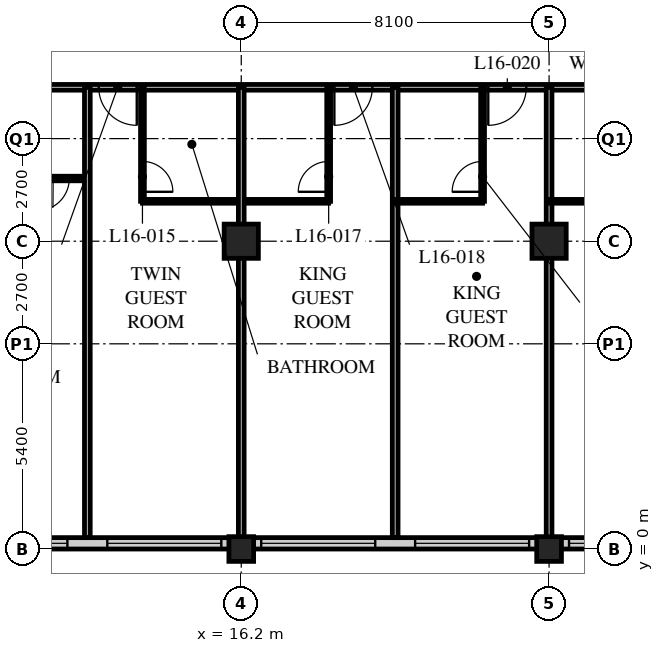
"""IFC4 building model, lengths in metres.
Left out: names, types, materials, properties, quantities, classifications, styles, units other than length and angle.
Written with IfcOpenShell. Run it as: python <this file> out.ifc"""

import sys

from ifc_helpers import new_model, si_unit, direction, frame, frame_2d, origin, origin_2d, place, context, subcontext, project, spatial, rectangle, hollow_rectangle, extrude, element, fill, save


model = new_model("IFC4")
c1 = context("Model", 3, precision=1e-05, world=origin(), true_north=direction((0.0, 1.0)))
c2 = subcontext(c1, "Body", "Model", "MODEL_VIEW")
j1 = project(units=[si_unit("LENGTHUNIT", "METRE"), si_unit("PLANEANGLEUNIT", "RADIAN")], contexts=[c1])
p1 = place(None, origin())
s1 = spatial("IfcSite", under=j1, at=p1, CompositionType="ELEMENT")
p2 = place(p1, origin())
s2 = spatial("IfcBuilding", under=s1, at=p2, CompositionType="ELEMENT")
p3 = place(p2, frame((0.0, 0.0, 67.0)))
s3 = spatial("IfcBuildingStorey", under=s2, at=p3, CompositionType="ELEMENT", Elevation=67.0)
p4 = place(p3, frame((16.2, 0.0, 0.0), z_axis=(0.0, 0.0, 1.0), x_axis=(1.0, 0.0, 0.0)))
e1 = element("IfcColumn", 1, at=p4, inside=s3, PredefinedType="COLUMN", context=c2, shape_type="SweptSolid", body=[
    extrude(hollow_rectangle(XDim=0.65, YDim=0.65, WallThickness=0.05, at=origin_2d()), origin(), (0.0, 0.0, 1.0), 3.4),
])
p5 = place(p3, frame((16.2, 8.1, 0.0), z_axis=(0.0, 0.0, 1.0), x_axis=(1.0, 0.0, 0.0)))
e2 = element("IfcColumn", 2, at=p5, inside=s3, PredefinedType="COLUMN", context=c2, shape_type="SweptSolid", body=[
    extrude(hollow_rectangle(XDim=0.9, YDim=0.9, WallThickness=0.09, at=origin_2d()), origin(), (0.0, 0.0, 1.0), 3.4),
])
p6 = place(p3, frame((24.3, 0.0, 0.0), z_axis=(0.0, 0.0, 1.0), x_axis=(1.0, 0.0, 0.0)))
e3 = element("IfcColumn", 3, at=p6, inside=s3, PredefinedType="COLUMN", context=c2, shape_type="SweptSolid", body=[
    extrude(hollow_rectangle(XDim=0.65, YDim=0.65, WallThickness=0.05, at=origin_2d()), origin(), (0.0, 0.0, 1.0), 3.4),
])
p7 = place(p3, frame((24.3, 8.1, 0.0), z_axis=(0.0, 0.0, 1.0), x_axis=(1.0, 0.0, 0.0)))
e4 = element("IfcColumn", 4, at=p7, inside=s3, PredefinedType="COLUMN", context=c2, shape_type="SweptSolid", body=[
    extrude(hollow_rectangle(XDim=0.9, YDim=0.9, WallThickness=0.09, at=origin_2d()), origin(), (0.0, 0.0, 1.0), 3.4),
])
p8 = place(p3, frame((8.4, 0.15, 0.0), z_axis=(0.0, 0.0, 1.0), x_axis=(1.0, 0.0, 0.0)))
e5 = element("IfcWall", 5, at=p8, inside=s3, PredefinedType="SOLIDWALL", context=c2, shape_type="SweptSolid", body=[
    extrude(rectangle(XDim=40.2, YDim=0.3, at=frame_2d((20.1, 0.0))), origin(), (0.0, 0.0, 1.0), 3.19),
])
p9 = place(p8, frame((0.225, 0.0, 0.9)))
e6 = element("IfcOpeningElement", 6, at=p9, cuts=e5, PredefinedType="OPENING", context=c2, shape_type="SweptSolid", body=[
    extrude(rectangle(XDim=3.0, YDim=2.0, at=frame_2d((1.5, 1.0))), frame((0.0, 0.16, 0.0), z_axis=(0.0, -1.0, 0.0), x_axis=(1.0, 0.0, 0.0)), (0.0, 0.0, 1.0), 0.32),
])
p10 = place(p8, frame((4.275, 0.0, 0.9)))
e7 = element("IfcOpeningElement", 7, at=p10, cuts=e5, PredefinedType="OPENING", context=c2, shape_type="SweptSolid", body=[
    extrude(rectangle(XDim=3.0, YDim=2.0, at=frame_2d((1.5, 1.0))), frame((0.0, 0.16, 0.0), z_axis=(0.0, -1.0, 0.0), x_axis=(1.0, 0.0, 0.0)), (0.0, 0.0, 1.0), 0.32),
])
p11 = place(p8, frame((8.325, 0.0, 0.9)))
e8 = element("IfcOpeningElement", 8, at=p11, cuts=e5, PredefinedType="OPENING", context=c2, shape_type="SweptSolid", body=[
    extrude(rectangle(XDim=3.0, YDim=2.0, at=frame_2d((1.5, 1.0))), frame((0.0, 0.16, 0.0), z_axis=(0.0, -1.0, 0.0), x_axis=(1.0, 0.0, 0.0)), (0.0, 0.0, 1.0), 0.32),
])
p12 = place(p8, frame((12.375, 0.0, 0.9)))
e9 = element("IfcOpeningElement", 9, at=p12, cuts=e5, PredefinedType="OPENING", context=c2, shape_type="SweptSolid", body=[
    extrude(rectangle(XDim=3.0, YDim=2.0, at=frame_2d((1.5, 1.0))), frame((0.0, 0.16, 0.0), z_axis=(0.0, -1.0, 0.0), x_axis=(1.0, 0.0, 0.0)), (0.0, 0.0, 1.0), 0.32),
])
p13 = place(p8, frame((16.425, 0.0, 0.9)))
e10 = element("IfcOpeningElement", 10, at=p13, cuts=e5, PredefinedType="OPENING", context=c2, shape_type="SweptSolid", body=[
    extrude(rectangle(XDim=3.0, YDim=2.0, at=frame_2d((1.5, 1.0))), frame((0.0, 0.16, 0.0), z_axis=(0.0, -1.0, 0.0), x_axis=(1.0, 0.0, 0.0)), (0.0, 0.0, 1.0), 0.32),
])
p14 = place(p8, frame((20.475, 0.0, 0.9)))
e11 = element("IfcOpeningElement", 11, at=p14, cuts=e5, PredefinedType="OPENING", context=c2, shape_type="SweptSolid", body=[
    extrude(rectangle(XDim=3.0, YDim=2.0, at=frame_2d((1.5, 1.0))), frame((0.0, 0.16, 0.0), z_axis=(0.0, -1.0, 0.0), x_axis=(1.0, 0.0, 0.0)), (0.0, 0.0, 1.0), 0.32),
])
p15 = place(p8, frame((24.525, 0.0, 0.9)))
e12 = element("IfcOpeningElement", 12, at=p15, cuts=e5, PredefinedType="OPENING", context=c2, shape_type="SweptSolid", body=[
    extrude(rectangle(XDim=3.0, YDim=2.0, at=frame_2d((1.5, 1.0))), frame((0.0, 0.16, 0.0), z_axis=(0.0, -1.0, 0.0), x_axis=(1.0, 0.0, 0.0)), (0.0, 0.0, 1.0), 0.32),
])
p16 = place(p8, frame((28.575, 0.0, 0.9)))
e13 = element("IfcOpeningElement", 13, at=p16, cuts=e5, PredefinedType="OPENING", context=c2, shape_type="SweptSolid", body=[
    extrude(rectangle(XDim=3.0, YDim=2.0, at=frame_2d((1.5, 1.0))), frame((0.0, 0.16, 0.0), z_axis=(0.0, -1.0, 0.0), x_axis=(1.0, 0.0, 0.0)), (0.0, 0.0, 1.0), 0.32),
])
p17 = place(p8, frame((32.625, 0.0, 0.9)))
e14 = element("IfcOpeningElement", 14, at=p17, cuts=e5, PredefinedType="OPENING", context=c2, shape_type="SweptSolid", body=[
    extrude(rectangle(XDim=3.0, YDim=2.0, at=frame_2d((1.5, 1.0))), frame((0.0, 0.16, 0.0), z_axis=(0.0, -1.0, 0.0), x_axis=(1.0, 0.0, 0.0)), (0.0, 0.0, 1.0), 0.32),
])
p18 = place(p8, frame((36.675, 0.0, 0.9)))
e15 = element("IfcOpeningElement", 15, at=p18, cuts=e5, PredefinedType="OPENING", context=c2, shape_type="SweptSolid", body=[
    extrude(rectangle(XDim=3.0, YDim=2.0, at=frame_2d((1.5, 1.0))), frame((0.0, 0.16, 0.0), z_axis=(0.0, -1.0, 0.0), x_axis=(1.0, 0.0, 0.0)), (0.0, 0.0, 1.0), 0.32),
])
p19 = place(p3, frame((8.1, 12.15, 0.0), z_axis=(0.0, 0.0, 1.0), x_axis=(1.0, 0.0, 0.0)))
e16 = element("IfcWall", 16, at=p19, inside=s3, PredefinedType="PARTITIONING", context=c2, shape_type="SweptSolid", body=[
    extrude(rectangle(XDim=36.45, YDim=0.15, at=frame_2d((18.225, 0.0))), origin(), (0.0, 0.0, 1.0), 3.19),
])
p20 = place(p19, frame((4.35, 0.0, 0.0)))
e17 = element("IfcOpeningElement", 17, at=p20, cuts=e16, PredefinedType="OPENING", context=c2, shape_type="SweptSolid", body=[
    extrude(rectangle(XDim=1.0, YDim=2.1, at=frame_2d((0.5, 1.05))), frame((0.0, 0.085, 0.0), z_axis=(0.0, -1.0, 0.0), x_axis=(1.0, 0.0, 0.0)), (0.0, 0.0, 1.0), 0.17),
])
p21 = place(p19, frame((10.55, 0.0, 0.0)))
e18 = element("IfcOpeningElement", 18, at=p21, cuts=e16, PredefinedType="OPENING", context=c2, shape_type="SweptSolid", body=[
    extrude(rectangle(XDim=1.0, YDim=2.1, at=frame_2d((0.5, 1.05))), frame((0.0, 0.085, 0.0), z_axis=(0.0, -1.0, 0.0), x_axis=(1.0, 0.0, 0.0)), (0.0, 0.0, 1.0), 0.17),
])
p22 = place(p19, frame((14.6, 0.0, 0.0)))
e19 = element("IfcOpeningElement", 19, at=p22, cuts=e16, PredefinedType="OPENING", context=c2, shape_type="SweptSolid", body=[
    extrude(rectangle(XDim=1.0, YDim=2.1, at=frame_2d((0.5, 1.05))), frame((0.0, 0.085, 0.0), z_axis=(0.0, -1.0, 0.0), x_axis=(1.0, 0.0, 0.0)), (0.0, 0.0, 1.0), 0.17),
])
p23 = place(p19, frame((18.65, 0.0, 0.0)))
e20 = element("IfcOpeningElement", 20, at=p23, cuts=e16, PredefinedType="OPENING", context=c2, shape_type="SweptSolid", body=[
    extrude(rectangle(XDim=1.0, YDim=2.1, at=frame_2d((0.5, 1.05))), frame((0.0, 0.085, 0.0), z_axis=(0.0, -1.0, 0.0), x_axis=(1.0, 0.0, 0.0)), (0.0, 0.0, 1.0), 0.17),
])
p24 = place(p19, frame((22.7, 0.0, 0.0)))
e21 = element("IfcOpeningElement", 21, at=p24, cuts=e16, PredefinedType="OPENING", context=c2, shape_type="SweptSolid", body=[
    extrude(rectangle(XDim=1.0, YDim=2.1, at=frame_2d((0.5, 1.05))), frame((0.0, 0.085, 0.0), z_axis=(0.0, -1.0, 0.0), x_axis=(1.0, 0.0, 0.0)), (0.0, 0.0, 1.0), 0.17),
])
p25 = place(p19, frame((24.6, 0.0, 0.0)))
e22 = element("IfcOpeningElement", 22, at=p25, cuts=e16, PredefinedType="OPENING", context=c2, shape_type="SweptSolid", body=[
    extrude(rectangle(XDim=1.0, YDim=2.1, at=frame_2d((0.5, 1.05))), frame((0.0, 0.085, 0.0), z_axis=(0.0, -1.0, 0.0), x_axis=(1.0, 0.0, 0.0)), (0.0, 0.0, 1.0), 0.17),
])
p26 = place(p19, frame((30.8, 0.0, 0.0)))
e23 = element("IfcOpeningElement", 23, at=p26, cuts=e16, PredefinedType="OPENING", context=c2, shape_type="SweptSolid", body=[
    extrude(rectangle(XDim=1.0, YDim=2.1, at=frame_2d((0.5, 1.05))), frame((0.0, 0.085, 0.0), z_axis=(0.0, -1.0, 0.0), x_axis=(1.0, 0.0, 0.0)), (0.0, 0.0, 1.0), 0.17),
])
p27 = place(p19, frame((1.525, 0.0, 0.0)))
e24 = element("IfcOpeningElement", 24, at=p27, cuts=e16, PredefinedType="OPENING", context=c2, shape_type="SweptSolid", body=[
    extrude(rectangle(XDim=1.0, YDim=2.1, at=frame_2d((0.5, 1.05))), frame((0.0, 0.085, 0.0), z_axis=(0.0, -1.0, 0.0), x_axis=(1.0, 0.0, 0.0)), (0.0, 0.0, 1.0), 0.17),
])
p28 = place(p19, frame((33.925, 0.0, 0.0)))
e25 = element("IfcOpeningElement", 25, at=p28, cuts=e16, PredefinedType="OPENING", context=c2, shape_type="SweptSolid", body=[
    extrude(rectangle(XDim=1.0, YDim=2.1, at=frame_2d((0.5, 1.05))), frame((0.0, 0.085, 0.0), z_axis=(0.0, -1.0, 0.0), x_axis=(1.0, 0.0, 0.0)), (0.0, 0.0, 1.0), 0.17),
])
p29 = place(p3, frame((13.6, 9.15, 0.0), z_axis=(0.0, 0.0, 1.0), x_axis=(1.0, 0.0, 0.0)))
e26 = element("IfcWall", 26, at=p29, inside=s3, PredefinedType="PARTITIONING", context=c2, shape_type="SweptSolid", body=[
    extrude(rectangle(XDim=4.9, YDim=0.1, at=frame_2d((2.45, 0.0))), origin(), (0.0, 0.0, 1.0), 3.19),
])
p30 = place(p3, frame((13.6, 12.15, 0.0), z_axis=(0.0, 0.0, 1.0), x_axis=(0.0, -1.0, 0.0)))
e27 = element("IfcWall", 27, at=p30, inside=s3, PredefinedType="PARTITIONING", context=c2, shape_type="SweptSolid", body=[
    extrude(rectangle(XDim=3.0, YDim=0.1, at=frame_2d((1.5, 0.0))), origin(), (0.0, 0.0, 1.0), 3.19),
])
p31 = place(p30, frame((1.95, 0.0, 0.0)))
e28 = element("IfcOpeningElement", 28, at=p31, cuts=e27, PredefinedType="OPENING", context=c2, shape_type="SweptSolid", body=[
    extrude(rectangle(XDim=0.8, YDim=2.1, at=frame_2d((0.4, 1.05))), frame((0.0, 0.06, 0.0), z_axis=(0.0, -1.0, 0.0), x_axis=(1.0, 0.0, 0.0)), (0.0, 0.0, 1.0), 0.12),
])
p32 = place(p3, frame((16.2, 12.15, 0.0), z_axis=(0.0, 0.0, 1.0), x_axis=(0.0, -1.0, 0.0)))
e29 = element("IfcWall", 29, at=p32, inside=s3, PredefinedType="PARTITIONING", context=c2, shape_type="SweptSolid", body=[
    extrude(rectangle(XDim=11.85, YDim=0.15, at=frame_2d((5.925, 0.0))), origin(), (0.0, 0.0, 1.0), 2.578),
])
p33 = place(p3, frame((18.5, 12.15, 0.0), z_axis=(0.0, 0.0, 1.0), x_axis=(0.0, -1.0, 0.0)))
e30 = element("IfcWall", 30, at=p33, inside=s3, PredefinedType="PARTITIONING", context=c2, shape_type="SweptSolid", body=[
    extrude(rectangle(XDim=3.0, YDim=0.1, at=frame_2d((1.5, 0.0))), origin(), (0.0, 0.0, 1.0), 3.19),
])
p34 = place(p33, frame((1.95, 0.0, 0.0)))
e31 = element("IfcOpeningElement", 31, at=p34, cuts=e30, PredefinedType="OPENING", context=c2, shape_type="SweptSolid", body=[
    extrude(rectangle(XDim=0.8, YDim=2.1, at=frame_2d((0.4, 1.05))), frame((0.0, 0.06, 0.0), z_axis=(0.0, -1.0, 0.0), x_axis=(1.0, 0.0, 0.0)), (0.0, 0.0, 1.0), 0.12),
])
p35 = place(p3, frame((20.25, 12.15, 0.0), z_axis=(0.0, 0.0, 1.0), x_axis=(0.0, -1.0, 0.0)))
e32 = element("IfcWall", 32, at=p35, inside=s3, PredefinedType="PARTITIONING", context=c2, shape_type="SweptSolid", body=[
    extrude(rectangle(XDim=11.85, YDim=0.15, at=frame_2d((5.925, 0.0))), origin(), (0.0, 0.0, 1.0), 3.19),
])
p36 = place(p3, frame((20.25, 9.15, 0.0), z_axis=(0.0, 0.0, 1.0), x_axis=(1.0, 0.0, 0.0)))
e33 = element("IfcWall", 33, at=p36, inside=s3, PredefinedType="PARTITIONING", context=c2, shape_type="SweptSolid", body=[
    extrude(rectangle(XDim=2.3, YDim=0.1, at=frame_2d((1.15, 0.0))), origin(), (0.0, 0.0, 1.0), 3.19),
])
p37 = place(p3, frame((22.55, 12.15, 0.0), z_axis=(0.0, 0.0, 1.0), x_axis=(0.0, -1.0, 0.0)))
e34 = element("IfcWall", 34, at=p37, inside=s3, PredefinedType="PARTITIONING", context=c2, shape_type="SweptSolid", body=[
    extrude(rectangle(XDim=3.0, YDim=0.1, at=frame_2d((1.5, 0.0))), origin(), (0.0, 0.0, 1.0), 3.19),
])
p38 = place(p37, frame((1.95, 0.0, 0.0)))
e35 = element("IfcOpeningElement", 35, at=p38, cuts=e34, PredefinedType="OPENING", context=c2, shape_type="SweptSolid", body=[
    extrude(rectangle(XDim=0.8, YDim=2.1, at=frame_2d((0.4, 1.05))), frame((0.0, 0.06, 0.0), z_axis=(0.0, -1.0, 0.0), x_axis=(1.0, 0.0, 0.0)), (0.0, 0.0, 1.0), 0.12),
])
p39 = place(p3, frame((24.3, 12.15, 0.0), z_axis=(0.0, 0.0, 1.0), x_axis=(0.0, -1.0, 0.0)))
e36 = element("IfcWall", 36, at=p39, inside=s3, PredefinedType="PARTITIONING", context=c2, shape_type="SweptSolid", body=[
    extrude(rectangle(XDim=11.85, YDim=0.15, at=frame_2d((5.925, 0.0))), origin(), (0.0, 0.0, 1.0), 2.578),
])
p40 = place(p3, frame((24.3, 9.15, 0.0), z_axis=(0.0, 0.0, 1.0), x_axis=(1.0, 0.0, 0.0)))
e37 = element("IfcWall", 37, at=p40, inside=s3, PredefinedType="PARTITIONING", context=c2, shape_type="SweptSolid", body=[
    extrude(rectangle(XDim=2.3, YDim=0.1, at=frame_2d((1.15, 0.0))), origin(), (0.0, 0.0, 1.0), 3.19),
])
p41 = place(p3, frame((4.1, 9.75, 0.0), z_axis=(0.0, 0.0, 1.0), x_axis=(1.0, 0.0, 0.0)))
e38 = element("IfcWall", 38, at=p41, inside=s3, PredefinedType="PARTITIONING", context=c2, shape_type="SweptSolid", body=[
    extrude(rectangle(XDim=8.05, YDim=0.12, at=frame_2d((4.025, 0.0))), origin(), (0.0, 0.0, 1.0), 3.19),
])
p42 = place(p41, frame((6.725, 0.0, 0.0)))
e39 = element("IfcOpeningElement", 39, at=p42, cuts=e38, PredefinedType="OPENING", context=c2, shape_type="SweptSolid", body=[
    extrude(rectangle(XDim=0.85, YDim=2.1, at=frame_2d((0.425, 1.05))), frame((0.0, 0.07, 0.0), z_axis=(0.0, -1.0, 0.0), x_axis=(1.0, 0.0, 0.0)), (0.0, 0.0, 1.0), 0.14),
])
p43 = place(p41, frame((2.875, 0.0, 0.0)))
e40 = element("IfcOpeningElement", 40, at=p43, cuts=e38, PredefinedType="OPENING", context=c2, shape_type="SweptSolid", body=[
    extrude(rectangle(XDim=0.85, YDim=2.1, at=frame_2d((0.425, 1.05))), frame((0.0, 0.07, 0.0), z_axis=(0.0, -1.0, 0.0), x_axis=(1.0, 0.0, 0.0)), (0.0, 0.0, 1.0), 0.14),
])
p44 = place(p3, frame((12.15, 12.15, 0.0), z_axis=(0.0, 0.0, 1.0), x_axis=(0.0, -1.0, 0.0)))
e41 = element("IfcWall", 41, at=p44, inside=s3, PredefinedType="PARTITIONING", context=c2, shape_type="SweptSolid", body=[
    extrude(rectangle(XDim=11.85, YDim=0.15, at=frame_2d((5.925, 0.0))), origin(), (0.0, 0.0, 1.0), 3.19),
])
p45 = place(p9, origin())
e42 = element("IfcWindow", 42, at=p45, inside=s3, PartitioningType="SINGLE_PANEL", PredefinedType="WINDOW", context=c2, shape_type="SweptSolid", body=[
    extrude(rectangle(XDim=3.0, YDim=2.0, at=frame_2d((1.5, 1.0))), frame((0.0, 0.03, 0.0), z_axis=(0.0, -1.0, 0.0), x_axis=(1.0, 0.0, 0.0)), (0.0, 0.0, 1.0), 0.06),
])
fill(e6, e42)
p46 = place(p10, origin())
e43 = element("IfcWindow", 43, at=p46, inside=s3, PartitioningType="SINGLE_PANEL", PredefinedType="WINDOW", context=c2, shape_type="SweptSolid", body=[
    extrude(rectangle(XDim=3.0, YDim=2.0, at=frame_2d((1.5, 1.0))), frame((0.0, 0.03, 0.0), z_axis=(0.0, -1.0, 0.0), x_axis=(1.0, 0.0, 0.0)), (0.0, 0.0, 1.0), 0.06),
])
fill(e7, e43)
p47 = place(p11, origin())
e44 = element("IfcWindow", 44, at=p47, inside=s3, PartitioningType="SINGLE_PANEL", PredefinedType="WINDOW", context=c2, shape_type="SweptSolid", body=[
    extrude(rectangle(XDim=3.0, YDim=2.0, at=frame_2d((1.5, 1.0))), frame((0.0, 0.03, 0.0), z_axis=(0.0, -1.0, 0.0), x_axis=(1.0, 0.0, 0.0)), (0.0, 0.0, 1.0), 0.06),
])
fill(e8, e44)
p48 = place(p12, origin())
e45 = element("IfcWindow", 45, at=p48, inside=s3, PartitioningType="SINGLE_PANEL", PredefinedType="WINDOW", context=c2, shape_type="SweptSolid", body=[
    extrude(rectangle(XDim=3.0, YDim=2.0, at=frame_2d((1.5, 1.0))), frame((0.0, 0.03, 0.0), z_axis=(0.0, -1.0, 0.0), x_axis=(1.0, 0.0, 0.0)), (0.0, 0.0, 1.0), 0.06),
])
fill(e9, e45)
p49 = place(p13, origin())
e46 = element("IfcWindow", 46, at=p49, inside=s3, PartitioningType="SINGLE_PANEL", PredefinedType="WINDOW", context=c2, shape_type="SweptSolid", body=[
    extrude(rectangle(XDim=3.0, YDim=2.0, at=frame_2d((1.5, 1.0))), frame((0.0, 0.03, 0.0), z_axis=(0.0, -1.0, 0.0), x_axis=(1.0, 0.0, 0.0)), (0.0, 0.0, 1.0), 0.06),
])
fill(e10, e46)
p50 = place(p31, origin())
e47 = element("IfcDoor", 47, at=p50, inside=s3, OperationType="SINGLE_SWING_RIGHT", PredefinedType="DOOR", context=c2, shape_type="SweptSolid", body=[
    extrude(rectangle(XDim=0.8, YDim=2.1, at=frame_2d((0.4, 1.05))), frame((0.0, 0.025, 0.0), z_axis=(0.0, -1.0, 0.0), x_axis=(1.0, 0.0, 0.0)), (0.0, 0.0, 1.0), 0.05),
])
fill(e28, e47)
p51 = place(p20, origin())
e48 = element("IfcDoor", 48, at=p51, inside=s3, OperationType="SINGLE_SWING_LEFT", PredefinedType="DOOR", context=c2, shape_type="SweptSolid", body=[
    extrude(rectangle(XDim=1.0, YDim=2.1, at=frame_2d((0.5, 1.05))), frame((0.0, 0.025, 0.0), z_axis=(0.0, -1.0, 0.0), x_axis=(1.0, 0.0, 0.0)), (0.0, 0.0, 1.0), 0.05),
])
fill(e17, e48)
p52 = place(p34, origin())
e49 = element("IfcDoor", 49, at=p52, inside=s3, OperationType="SINGLE_SWING_LEFT", PredefinedType="DOOR", context=c2, shape_type="SweptSolid", body=[
    extrude(rectangle(XDim=0.8, YDim=2.1, at=frame_2d((0.4, 1.05))), frame((0.0, 0.025, 0.0), z_axis=(0.0, -1.0, 0.0), x_axis=(1.0, 0.0, 0.0)), (0.0, 0.0, 1.0), 0.05),
])
fill(e31, e49)
p53 = place(p21, origin())
e50 = element("IfcDoor", 50, at=p53, inside=s3, OperationType="SINGLE_SWING_RIGHT", PredefinedType="DOOR", context=c2, shape_type="SweptSolid", body=[
    extrude(rectangle(XDim=1.0, YDim=2.1, at=frame_2d((0.5, 1.05))), frame((0.0, 0.025, 0.0), z_axis=(0.0, -1.0, 0.0), x_axis=(1.0, 0.0, 0.0)), (0.0, 0.0, 1.0), 0.05),
])
fill(e18, e50)
p54 = place(p38, origin())
e51 = element("IfcDoor", 51, at=p54, inside=s3, OperationType="SINGLE_SWING_LEFT", PredefinedType="DOOR", context=c2, shape_type="SweptSolid", body=[
    extrude(rectangle(XDim=0.8, YDim=2.1, at=frame_2d((0.4, 1.05))), frame((0.0, 0.025, 0.0), z_axis=(0.0, -1.0, 0.0), x_axis=(1.0, 0.0, 0.0)), (0.0, 0.0, 1.0), 0.05),
])
fill(e35, e51)
p55 = place(p22, origin())
e52 = element("IfcDoor", 52, at=p55, inside=s3, OperationType="SINGLE_SWING_RIGHT", PredefinedType="DOOR", context=c2, shape_type="SweptSolid", body=[
    extrude(rectangle(XDim=1.0, YDim=2.1, at=frame_2d((0.5, 1.05))), frame((0.0, 0.025, 0.0), z_axis=(0.0, -1.0, 0.0), x_axis=(1.0, 0.0, 0.0)), (0.0, 0.0, 1.0), 0.05),
])
fill(e19, e52)
p56 = place(p42, origin())
e53 = element("IfcDoor", 53, at=p56, inside=s3, OperationType="SINGLE_SWING_RIGHT", PredefinedType="DOOR", context=c2, shape_type="SweptSolid", body=[
    extrude(rectangle(XDim=0.85, YDim=2.1, at=frame_2d((0.425, 1.05))), frame((0.0, 0.025, 0.0), z_axis=(0.0, -1.0, 0.0), x_axis=(1.0, 0.0, 0.0)), (0.0, 0.0, 1.0), 0.05),
])
fill(e39, e53)
save(model, sys.argv[1])
